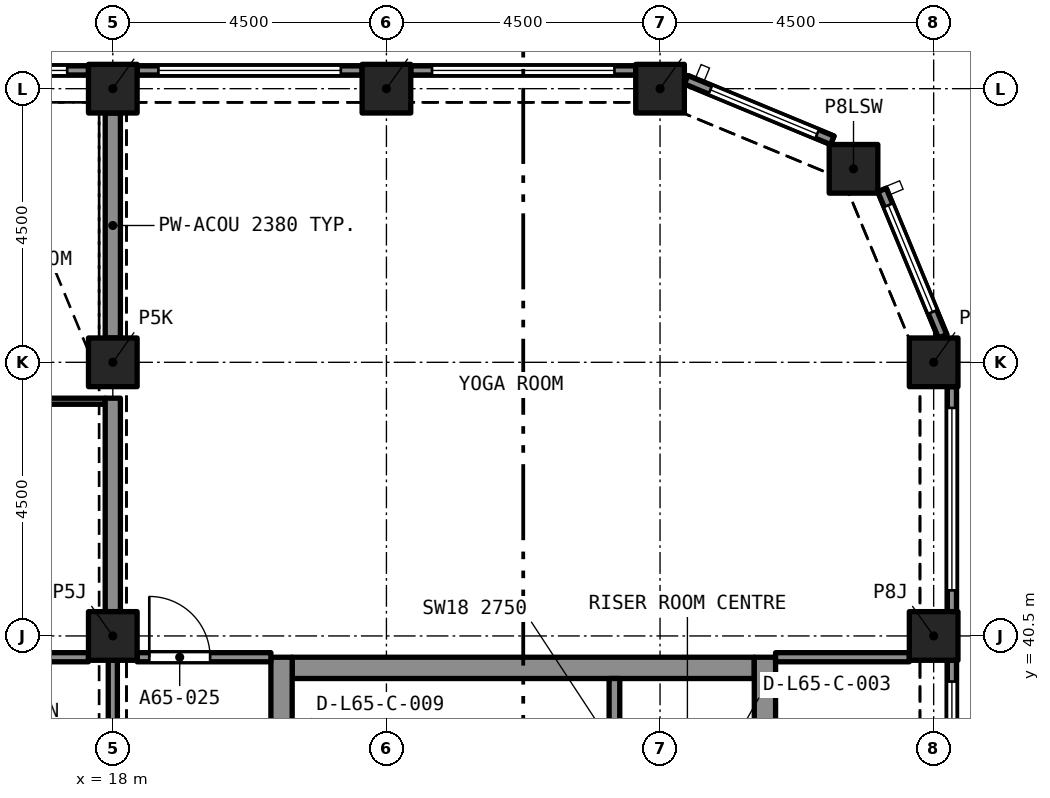
"""IFC4 building model, lengths in metres.
Left out: names, types, materials, properties, quantities, classifications, styles, units other than length and angle.
Written with IfcOpenShell. Run it as: python <this file> out.ifc"""

import sys

from ifc_helpers import new_model, si_unit, direction, frame, frame_2d, origin, origin_2d, place, context, subcontext, project, spatial, rectangle, extrude, element, fill, save


model = new_model("IFC4")
c1 = context("Model", 3, precision=1e-05, world=origin(), true_north=direction((0.0, 1.0)))
c2 = subcontext(c1, "Body", "Model", "MODEL_VIEW")
j1 = project(units=[si_unit("LENGTHUNIT", "METRE"), si_unit("PLANEANGLEUNIT", "RADIAN")], contexts=[c1])
p1 = place(None, origin())
s1 = spatial("IfcSite", under=j1, at=p1, CompositionType="ELEMENT")
p2 = place(p1, origin())
s2 = spatial("IfcBuilding", under=s1, at=p2, CompositionType="ELEMENT")
p3 = place(p2, frame((0.0, 0.0, 232.495)))
s3 = spatial("IfcBuildingStorey", under=s2, at=p3, CompositionType="ELEMENT", Elevation=232.495)
for number, where, z_axis, x_axis in (
    (1, (18.0, 40.5, 0.0), (0.0, 0.0, 1.0), (1.0, 0.0, 0.0)),
    (2, (31.5, 40.5, 0.0), (0.0, 0.0, 1.0), (1.0, 0.0, 0.0)),
    (3, (18.0, 45.0, 0.0), (0.0, 0.0, 1.0), (1.0, 0.0, 0.0)),
    (4, (31.5, 45.0, 0.0), (0.0, 0.0, 1.0), (1.0, 0.0, 0.0)),
    (5, (30.182, 48.182, 0.0), (0.0, 0.0, 1.0), (1.0, 0.0, 0.0)),
    (6, (18.0, 49.5, 0.0), (0.0, 0.0, 1.0), (1.0, 0.0, 0.0)),
    (7, (22.5, 49.5, 0.0), (0.0, 0.0, 1.0), (1.0, 0.0, 0.0)),
    (8, (27.0, 49.5, 0.0), (0.0, 0.0, 1.0), (1.0, 0.0, 0.0)),
):
    element("IfcColumn", number, at=place(p3, frame(where, z_axis=z_axis, x_axis=x_axis)), inside=s3, PredefinedType="COLUMN", context=c2, shape_type="SweptSolid", body=[
        extrude(rectangle(XDim=0.8, YDim=0.8, at=origin_2d()), origin(), (0.0, 0.0, 1.0), 3.2),
    ])
p4 = place(p3, frame((20.95, 39.975, 0.0), z_axis=(0.0, 0.0, 1.0), x_axis=(1.0, 0.0, 0.0)))
e9 = element("IfcWall", 9, at=p4, inside=s3, PredefinedType="SOLIDWALL", context=c2, shape_type="SweptSolid", body=[
    extrude(rectangle(XDim=7.6, YDim=0.35, at=frame_2d((3.8, 0.0))), origin(), (0.0, 0.0, 1.0), 3.2),
])
p5 = place(p3, frame((20.775, 27.35, 0.0), z_axis=(0.0, 0.0, 1.0), x_axis=(0.0, 1.0, 0.0)))
e10 = element("IfcWall", 10, at=p5, inside=s3, PredefinedType="SOLIDWALL", context=c2, shape_type="SweptSolid", body=[
    extrude(rectangle(XDim=12.8, YDim=0.35, at=frame_2d((6.4, 0.0))), origin(), (0.0, 0.0, 1.0), 3.2),
])
p6 = place(p5, frame((8.6, 0.0, 0.0)))
e11 = element("IfcOpeningElement", 11, at=p6, cuts=e10, PredefinedType="OPENING", context=c2, shape_type="SweptSolid", body=[
    extrude(rectangle(XDim=1.2, YDim=2.1, at=frame_2d((0.6, 1.05))), frame((0.0, 0.185, 0.0), z_axis=(0.0, -1.0, 0.0), x_axis=(1.0, 0.0, 0.0)), (0.0, 0.0, 1.0), 0.37),
])
p7 = place(p3, frame((28.725, 27.35, 0.0), z_axis=(0.0, 0.0, 1.0), x_axis=(0.0, 1.0, 0.0)))
e12 = element("IfcWall", 12, at=p7, inside=s3, PredefinedType="SOLIDWALL", context=c2, shape_type="SweptSolid", body=[
    extrude(rectangle(XDim=12.8, YDim=0.35, at=frame_2d((6.4, 0.0))), origin(), (0.0, 0.0, 1.0), 3.2),
])
p8 = place(p7, frame((8.6, 0.0, 0.0)))
e13 = element("IfcOpeningElement", 13, at=p8, cuts=e12, PredefinedType="OPENING", context=c2, shape_type="SweptSolid", body=[
    extrude(rectangle(XDim=1.2, YDim=2.1, at=frame_2d((0.6, 1.05))), frame((0.0, 0.185, 0.0), z_axis=(0.0, -1.0, 0.0), x_axis=(1.0, 0.0, 0.0)), (0.0, 0.0, 1.0), 0.37),
])
p9 = place(p3, frame((31.8, 40.1, 0.0), z_axis=(0.0, 0.0, 1.0), x_axis=(0.0, -1.0, 0.0)))
e14 = element("IfcWall", 14, at=p9, inside=s3, PredefinedType="SOLIDWALL", context=c2, shape_type="SweptSolid", body=[
    extrude(rectangle(XDim=3.7, YDim=0.15, at=frame_2d((1.85, 0.0))), origin(), (0.0, 0.0, 1.0), 3.2),
])
p10 = place(p9, frame((0.35, 0.0, 0.45)))
e15 = element("IfcOpeningElement", 15, at=p10, cuts=e14, PredefinedType="OPENING", context=c2, shape_type="SweptSolid", body=[
    extrude(rectangle(XDim=3.0, YDim=1.95, at=frame_2d((1.5, 0.975))), frame((0.0, 0.085, 0.0), z_axis=(0.0, -1.0, 0.0), x_axis=(1.0, 0.0, 0.0)), (0.0, 0.0, 1.0), 0.17),
])
p11 = place(p3, frame((31.8, 44.6, 0.0), z_axis=(0.0, 0.0, 1.0), x_axis=(0.0, -1.0, 0.0)))
e16 = element("IfcWall", 16, at=p11, inside=s3, PredefinedType="SOLIDWALL", context=c2, shape_type="SweptSolid", body=[
    extrude(rectangle(XDim=3.7, YDim=0.15, at=frame_2d((1.85, 0.0))), origin(), (0.0, 0.0, 1.0), 3.2),
])
p12 = place(p11, frame((0.35, 0.0, 0.45)))
e17 = element("IfcOpeningElement", 17, at=p12, cuts=e16, PredefinedType="OPENING", context=c2, shape_type="SweptSolid", body=[
    extrude(rectangle(XDim=3.0, YDim=1.95, at=frame_2d((1.5, 0.975))), frame((0.0, 0.085, 0.0), z_axis=(0.0, -1.0, 0.0), x_axis=(1.0, 0.0, 0.0)), (0.0, 0.0, 1.0), 0.17),
])
p13 = place(p3, frame((30.651, 47.833, 0.0), z_axis=(0.0, 0.0, 1.0), x_axis=(0.382669406082, -0.923885342263, 0.0)))
e18 = element("IfcWall", 18, at=p13, inside=s3, PredefinedType="SOLIDWALL", context=c2, shape_type="SweptSolid", body=[
    extrude(rectangle(XDim=2.602, YDim=0.15, at=frame_2d((1.301, 0.0))), origin(), (0.0, 0.0, 1.0), 3.2),
])
p14 = place(p13, frame((0.27, 0.0, 0.45)))
e19 = element("IfcOpeningElement", 19, at=p14, cuts=e18, PredefinedType="OPENING", context=c2, shape_type="SweptSolid", body=[
    extrude(rectangle(XDim=1.9, YDim=1.95, at=frame_2d((0.95, 0.975))), frame((0.0, 0.085, 0.0), z_axis=(0.0, -1.0, 0.0), x_axis=(1.0, 0.0, 0.0)), (0.0, 0.0, 1.0), 0.17),
])
p15 = place(p3, frame((27.429, 49.647, 0.0), z_axis=(0.0, 0.0, 1.0), x_axis=(0.923885342263, -0.382669406082, 0.0)))
e20 = element("IfcWall", 20, at=p15, inside=s3, PredefinedType="SOLIDWALL", context=c2, shape_type="SweptSolid", body=[
    extrude(rectangle(XDim=2.602, YDim=0.15, at=frame_2d((1.301, 0.0))), origin(), (0.0, 0.0, 1.0), 3.2),
])
p16 = place(p15, frame((0.432, 0.0, 0.45)))
e21 = element("IfcOpeningElement", 21, at=p16, cuts=e20, PredefinedType="OPENING", context=c2, shape_type="SweptSolid", body=[
    extrude(rectangle(XDim=1.9, YDim=1.95, at=frame_2d((0.95, 0.975))), frame((0.0, 0.085, 0.0), z_axis=(0.0, -1.0, 0.0), x_axis=(1.0, 0.0, 0.0)), (0.0, 0.0, 1.0), 0.17),
])
p17 = place(p3, frame((22.9, 49.8, 0.0), z_axis=(0.0, 0.0, 1.0), x_axis=(1.0, 0.0, 0.0)))
e22 = element("IfcWall", 22, at=p17, inside=s3, PredefinedType="SOLIDWALL", context=c2, shape_type="SweptSolid", body=[
    extrude(rectangle(XDim=3.7, YDim=0.15, at=frame_2d((1.85, 0.0))), origin(), (0.0, 0.0, 1.0), 3.2),
])
p18 = place(p17, frame((0.35, 0.0, 0.45)))
e23 = element("IfcOpeningElement", 23, at=p18, cuts=e22, PredefinedType="OPENING", context=c2, shape_type="SweptSolid", body=[
    extrude(rectangle(XDim=3.0, YDim=1.95, at=frame_2d((1.5, 0.975))), frame((0.0, 0.085, 0.0), z_axis=(0.0, -1.0, 0.0), x_axis=(1.0, 0.0, 0.0)), (0.0, 0.0, 1.0), 0.17),
])
p19 = place(p3, frame((18.4, 49.8, 0.0), z_axis=(0.0, 0.0, 1.0), x_axis=(1.0, 0.0, 0.0)))
e24 = element("IfcWall", 24, at=p19, inside=s3, PredefinedType="SOLIDWALL", context=c2, shape_type="SweptSolid", body=[
    extrude(rectangle(XDim=3.7, YDim=0.15, at=frame_2d((1.85, 0.0))), origin(), (0.0, 0.0, 1.0), 3.2),
])
p20 = place(p19, frame((0.35, 0.0, 0.45)))
e25 = element("IfcOpeningElement", 25, at=p20, cuts=e24, PredefinedType="OPENING", context=c2, shape_type="SweptSolid", body=[
    extrude(rectangle(XDim=3.0, YDim=1.95, at=frame_2d((1.5, 0.975))), frame((0.0, 0.085, 0.0), z_axis=(0.0, -1.0, 0.0), x_axis=(1.0, 0.0, 0.0)), (0.0, 0.0, 1.0), 0.17),
])
p21 = place(p3, frame((13.9, 49.8, 0.0), z_axis=(0.0, 0.0, 1.0), x_axis=(1.0, 0.0, 0.0)))
e26 = element("IfcWall", 26, at=p21, inside=s3, PredefinedType="SOLIDWALL", context=c2, shape_type="SweptSolid", body=[
    extrude(rectangle(XDim=3.7, YDim=0.15, at=frame_2d((1.85, 0.0))), origin(), (0.0, 0.0, 1.0), 3.2),
])
p22 = place(p21, frame((0.35, 0.0, 0.45)))
e27 = element("IfcOpeningElement", 27, at=p22, cuts=e26, PredefinedType="OPENING", context=c2, shape_type="SweptSolid", body=[
    extrude(rectangle(XDim=3.0, YDim=1.95, at=frame_2d((1.5, 0.975))), frame((0.0, 0.085, 0.0), z_axis=(0.0, -1.0, 0.0), x_axis=(1.0, 0.0, 0.0)), (0.0, 0.0, 1.0), 0.17),
])
for number, where, z_axis, x_axis in (
    (28, (31.8, 40.1, 3.2), (0.0, 0.0, 1.0), (0.0, -1.0, 0.0)),
    (29, (31.8, 44.6, 3.2), (0.0, 0.0, 1.0), (0.0, -1.0, 0.0)),
):
    element("IfcWall", number, at=place(p3, frame(where, z_axis=z_axis, x_axis=x_axis)), inside=s3, PredefinedType="PARAPET", context=c2, shape_type="SweptSolid", body=[
        extrude(rectangle(XDim=3.7, YDim=0.15, at=frame_2d((1.85, 0.0))), origin(), (0.0, 0.0, 1.0), 1.1),
    ])
for number, where, z_axis, x_axis in (
    (30, (30.651, 47.833, 3.2), (0.0, 0.0, 1.0), (0.383, -0.924, 0.0)),
    (31, (27.429, 49.647, 3.2), (0.0, 0.0, 1.0), (0.924, -0.383, 0.0)),
):
    element("IfcWall", number, at=place(p3, frame(where, z_axis=z_axis, x_axis=x_axis)), inside=s3, PredefinedType="PARAPET", context=c2, shape_type="SweptSolid", body=[
        extrude(rectangle(XDim=2.602, YDim=0.15, at=frame_2d((1.301, 0.0))), origin(), (0.0, 0.0, 1.0), 1.1),
    ])
for number, where, z_axis, x_axis in (
    (32, (22.9, 49.8, 3.2), (0.0, 0.0, 1.0), (1.0, 0.0, 0.0)),
    (33, (18.4, 49.8, 3.2), (0.0, 0.0, 1.0), (1.0, 0.0, 0.0)),
    (34, (13.9, 49.8, 3.2), (0.0, 0.0, 1.0), (1.0, 0.0, 0.0)),
):
    element("IfcWall", number, at=place(p3, frame(where, z_axis=z_axis, x_axis=x_axis)), inside=s3, PredefinedType="PARAPET", context=c2, shape_type="SweptSolid", body=[
        extrude(rectangle(XDim=3.7, YDim=0.15, at=frame_2d((1.85, 0.0))), origin(), (0.0, 0.0, 1.0), 1.1),
    ])
p23 = place(p3, frame((13.5, 44.36, 0.0), z_axis=(0.0, 0.0, 1.0), x_axis=(1.0, 0.0, 0.0)))
e35 = element("IfcWall", 35, at=p23, inside=s3, PredefinedType="PARTITIONING", context=c2, shape_type="SweptSolid", body=[
    extrude(rectangle(XDim=4.375, YDim=0.1, at=frame_2d((2.188, 0.0))), origin(), (0.0, 0.0, 1.0), 2.85),
])
p24 = place(p23, frame((1.8, 0.0, 0.0)))
e36 = element("IfcOpeningElement", 36, at=p24, cuts=e35, PredefinedType="OPENING", context=c2, shape_type="SweptSolid", body=[
    extrude(rectangle(XDim=0.9, YDim=2.1, at=frame_2d((0.45, 1.05))), frame((0.0, 0.06, 0.0), z_axis=(0.0, -1.0, 0.0), x_axis=(1.0, 0.0, 0.0)), (0.0, 0.0, 1.0), 0.12),
])
p25 = place(p3, frame((18.0, 45.4, 0.0), z_axis=(0.0, 0.0, 1.0), x_axis=(0.0, 1.0, 0.0)))
e37 = element("IfcWall", 37, at=p25, inside=s3, PredefinedType="PARTITIONING", context=c2, shape_type="SweptSolid", body=[
    extrude(rectangle(XDim=3.7, YDim=0.25, at=frame_2d((1.85, 0.0))), origin(), (0.0, 0.0, 1.0), 2.38),
])
p26 = place(p3, frame((18.0, 40.9, 0.0), z_axis=(0.0, 0.0, 1.0), x_axis=(0.0, 1.0, 0.0)))
e38 = element("IfcWall", 38, at=p26, inside=s3, PredefinedType="PARTITIONING", context=c2, shape_type="SweptSolid", body=[
    extrude(rectangle(XDim=3.51, YDim=0.25, at=frame_2d((1.755, 0.0))), origin(), (0.0, 0.0, 1.0), 2.38),
])
p27 = place(p3, frame((14.95, 40.15, 0.0), z_axis=(0.0, 0.0, 1.0), x_axis=(1.0, 0.0, 0.0)))
e39 = element("IfcWall", 39, at=p27, inside=s3, PredefinedType="PARTITIONING", context=c2, shape_type="SweptSolid", body=[
    extrude(rectangle(XDim=2.65, YDim=0.15, at=frame_2d((1.325, 0.0))), origin(), (0.0, 0.0, 1.0), 2.85),
])
p28 = place(p27, frame((0.2, 0.0, 0.0)))
e40 = element("IfcOpeningElement", 40, at=p28, cuts=e39, PredefinedType="OPENING", context=c2, shape_type="SweptSolid", body=[
    extrude(rectangle(XDim=1.2, YDim=2.4, at=frame_2d((0.6, 1.2))), frame((0.0, 0.085, 0.0), z_axis=(0.0, -1.0, 0.0), x_axis=(1.0, 0.0, 0.0)), (0.0, 0.0, 1.0), 0.17),
])
p29 = place(p3, frame((18.4, 40.15, 0.0), z_axis=(0.0, 0.0, 1.0), x_axis=(1.0, 0.0, 0.0)))
e41 = element("IfcWall", 41, at=p29, inside=s3, PredefinedType="PARTITIONING", context=c2, shape_type="SweptSolid", body=[
    extrude(rectangle(XDim=2.2, YDim=0.15, at=frame_2d((1.1, 0.0))), origin(), (0.0, 0.0, 1.0), 2.75),
])
p30 = place(p29, frame((0.2, 0.0, 0.0)))
e42 = element("IfcOpeningElement", 42, at=p30, cuts=e41, PredefinedType="OPENING", context=c2, shape_type="SweptSolid", body=[
    extrude(rectangle(XDim=1.0, YDim=2.1, at=frame_2d((0.5, 1.05))), frame((0.0, 0.085, 0.0), z_axis=(0.0, -1.0, 0.0), x_axis=(1.0, 0.0, 0.0)), (0.0, 0.0, 1.0), 0.17),
])
p31 = place(p3, frame((28.9, 40.15, 0.0), z_axis=(0.0, 0.0, 1.0), x_axis=(1.0, 0.0, 0.0)))
e43 = element("IfcWall", 43, at=p31, inside=s3, PredefinedType="PARTITIONING", context=c2, shape_type="SweptSolid", body=[
    extrude(rectangle(XDim=2.2, YDim=0.15, at=frame_2d((1.1, 0.0))), origin(), (0.0, 0.0, 1.0), 2.75),
])
p32 = place(p3, frame((18.0, 40.1, 0.0), z_axis=(0.0, 0.0, 1.0), x_axis=(0.0, -1.0, 0.0)))
e44 = element("IfcWall", 44, at=p32, inside=s3, PredefinedType="PARTITIONING", context=c2, shape_type="SweptSolid", body=[
    extrude(rectangle(XDim=3.7, YDim=0.15, at=frame_2d((1.85, 0.0))), origin(), (0.0, 0.0, 1.0), 2.38),
])
p33 = place(p32, frame((1.25, 0.0, 0.0)))
e45 = element("IfcOpeningElement", 45, at=p33, cuts=e44, PredefinedType="OPENING", context=c2, shape_type="SweptSolid", body=[
    extrude(rectangle(XDim=1.2, YDim=2.1, at=frame_2d((0.6, 1.05))), frame((0.0, 0.085, 0.0), z_axis=(0.0, -1.0, 0.0), x_axis=(1.0, 0.0, 0.0)), (0.0, 0.0, 1.0), 0.17),
])
p34 = place(p3, frame((26.25, 37.5, 0.0), z_axis=(0.0, 0.0, 1.0), x_axis=(0.0, 1.0, 0.0)))
e46 = element("IfcWall", 46, at=p34, inside=s3, PredefinedType="SOLIDWALL", context=c2, shape_type="SweptSolid", body=[
    extrude(rectangle(XDim=2.3, YDim=0.175, at=frame_2d((1.15, 0.0))), origin(), (0.0, 0.0, 1.0), 2.75),
])
p35 = place(p10, origin())
e47 = element("IfcWindow", 47, at=p35, inside=s3, PartitioningType="SINGLE_PANEL", PredefinedType="WINDOW", context=c2, shape_type="SweptSolid", body=[
    extrude(rectangle(XDim=3.0, YDim=1.95, at=frame_2d((1.5, 0.975))), frame((0.0, 0.03, 0.0), z_axis=(0.0, -1.0, 0.0), x_axis=(1.0, 0.0, 0.0)), (0.0, 0.0, 1.0), 0.06),
])
fill(e15, e47)
p36 = place(p12, origin())
e48 = element("IfcWindow", 48, at=p36, inside=s3, PartitioningType="SINGLE_PANEL", PredefinedType="WINDOW", context=c2, shape_type="SweptSolid", body=[
    extrude(rectangle(XDim=3.0, YDim=1.95, at=frame_2d((1.5, 0.975))), frame((0.0, 0.03, 0.0), z_axis=(0.0, -1.0, 0.0), x_axis=(1.0, 0.0, 0.0)), (0.0, 0.0, 1.0), 0.06),
])
fill(e17, e48)
p37 = place(p14, origin())
e49 = element("IfcWindow", 49, at=p37, inside=s3, PartitioningType="SINGLE_PANEL", PredefinedType="WINDOW", context=c2, shape_type="SweptSolid", body=[
    extrude(rectangle(XDim=1.9, YDim=1.95, at=frame_2d((0.95, 0.975))), frame((0.0, 0.03, 0.0), z_axis=(0.0, -1.0, 0.0), x_axis=(1.0, 0.0, 0.0)), (0.0, 0.0, 1.0), 0.06),
])
fill(e19, e49)
p38 = place(p16, origin())
e50 = element("IfcWindow", 50, at=p38, inside=s3, PartitioningType="SINGLE_PANEL", PredefinedType="WINDOW", context=c2, shape_type="SweptSolid", body=[
    extrude(rectangle(XDim=1.9, YDim=1.95, at=frame_2d((0.95, 0.975))), frame((0.0, 0.03, 0.0), z_axis=(0.0, -1.0, 0.0), x_axis=(1.0, 0.0, 0.0)), (0.0, 0.0, 1.0), 0.06),
])
fill(e21, e50)
p39 = place(p18, origin())
e51 = element("IfcWindow", 51, at=p39, inside=s3, PartitioningType="SINGLE_PANEL", PredefinedType="WINDOW", context=c2, shape_type="SweptSolid", body=[
    extrude(rectangle(XDim=3.0, YDim=1.95, at=frame_2d((1.5, 0.975))), frame((0.0, 0.03, 0.0), z_axis=(0.0, -1.0, 0.0), x_axis=(1.0, 0.0, 0.0)), (0.0, 0.0, 1.0), 0.06),
])
fill(e23, e51)
p40 = place(p20, origin())
e52 = element("IfcWindow", 52, at=p40, inside=s3, PartitioningType="SINGLE_PANEL", PredefinedType="WINDOW", context=c2, shape_type="SweptSolid", body=[
    extrude(rectangle(XDim=3.0, YDim=1.95, at=frame_2d((1.5, 0.975))), frame((0.0, 0.03, 0.0), z_axis=(0.0, -1.0, 0.0), x_axis=(1.0, 0.0, 0.0)), (0.0, 0.0, 1.0), 0.06),
])
fill(e25, e52)
p41 = place(p22, origin())
e53 = element("IfcWindow", 53, at=p41, inside=s3, PartitioningType="SINGLE_PANEL", PredefinedType="WINDOW", context=c2, shape_type="SweptSolid", body=[
    extrude(rectangle(XDim=3.0, YDim=1.95, at=frame_2d((1.5, 0.975))), frame((0.0, 0.03, 0.0), z_axis=(0.0, -1.0, 0.0), x_axis=(1.0, 0.0, 0.0)), (0.0, 0.0, 1.0), 0.06),
])
fill(e27, e53)
p42 = place(p30, origin())
e54 = element("IfcDoor", 54, at=p42, inside=s3, OperationType="SINGLE_SWING_LEFT", PredefinedType="DOOR", context=c2, shape_type="SweptSolid", body=[
    extrude(rectangle(XDim=1.0, YDim=2.1, at=frame_2d((0.5, 1.05))), frame((0.0, 0.025, 0.0), z_axis=(0.0, -1.0, 0.0), x_axis=(1.0, 0.0, 0.0)), (0.0, 0.0, 1.0), 0.05),
])
fill(e42, e54)
save(model, sys.argv[1])
